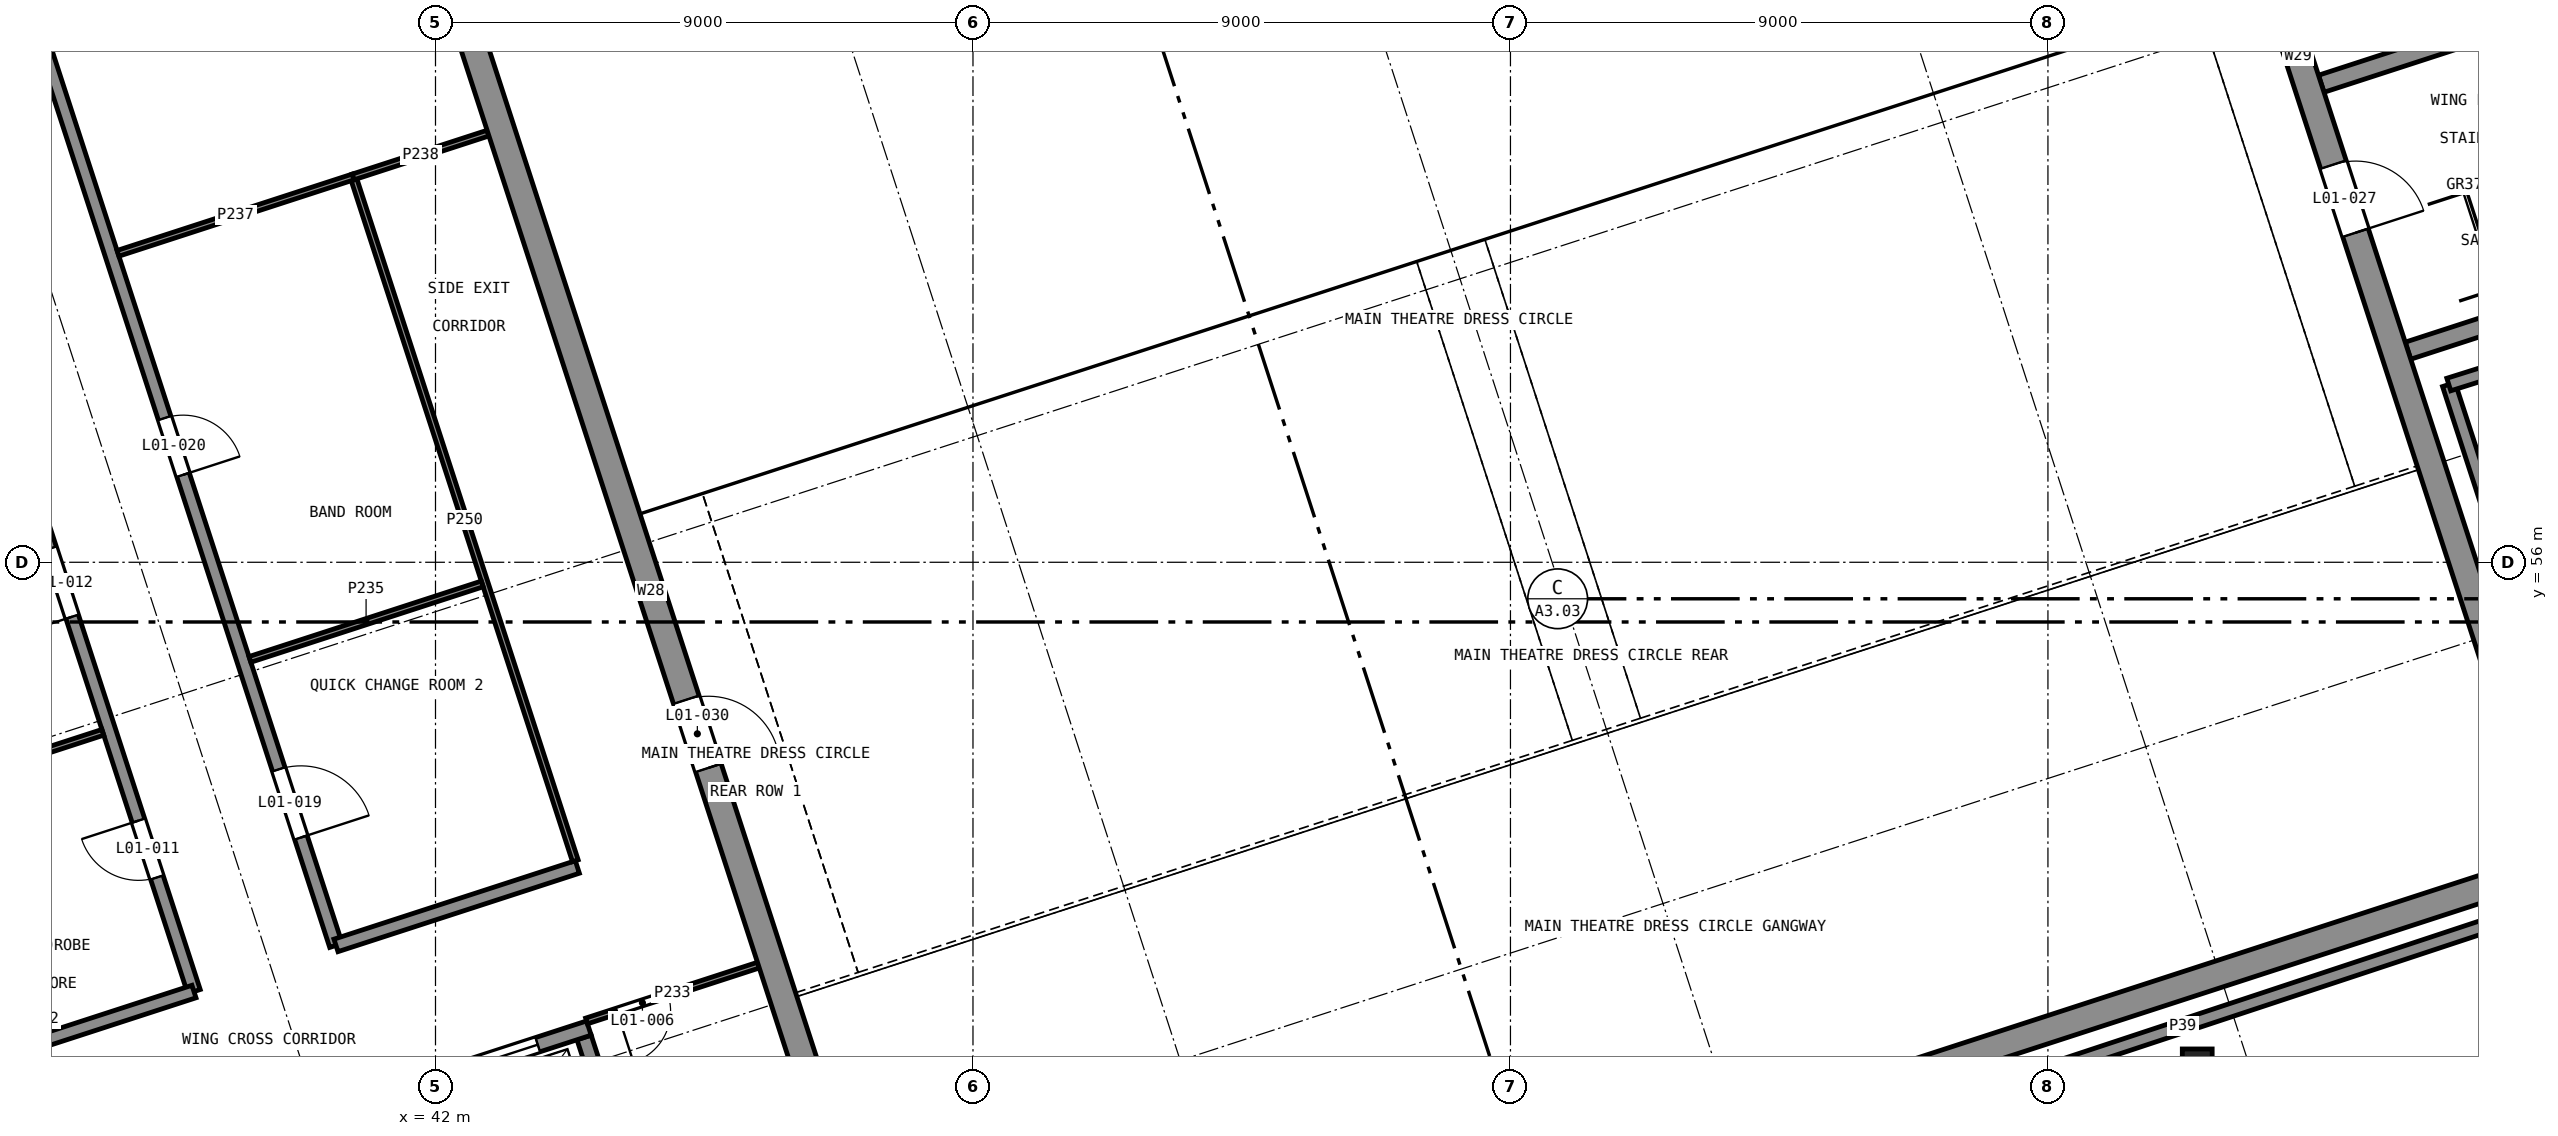
"""IFC4 building model, lengths in metres.
Left out: names, types, materials, properties, quantities, classifications, styles, units other than length and angle.
Written with IfcOpenShell. Run it as: python <this file> out.ifc"""

import sys

from ifc_helpers import new_model, si_unit, direction, frame, frame_2d, origin, origin_2d, place, context, subcontext, project, spatial, rectangle, extrude, element, fill, save


model = new_model("IFC4")
c1 = context("Model", 3, precision=1e-05, world=origin(), true_north=direction((0.0, 1.0)))
c2 = subcontext(c1, "Body", "Model", "MODEL_VIEW")
j1 = project(units=[si_unit("LENGTHUNIT", "METRE"), si_unit("PLANEANGLEUNIT", "RADIAN")], contexts=[c1])
p1 = place(None, origin())
s1 = spatial("IfcSite", under=j1, at=p1, CompositionType="ELEMENT")
p2 = place(p1, origin())
s2 = spatial("IfcBuilding", under=s1, at=p2, CompositionType="ELEMENT")
p3 = place(p2, frame((0.0, 0.0, 5.5)))
s3 = spatial("IfcBuildingStorey", under=s2, at=p3, CompositionType="ELEMENT", Elevation=5.5)
p4 = place(p3, frame((49.786, 41.93, 0.0), z_axis=(0.0, 0.0, 1.0), x_axis=(0.951055937194, 0.309018776661, 0.0)))
e1 = element("IfcWall", 1, at=p4, inside=s3, PredefinedType="SHEAR", context=c2, shape_type="SweptSolid", body=[
    extrude(rectangle(XDim=29.45, YDim=0.45, at=frame_2d((14.725, 0.0))), origin(), (0.0, 0.0, 1.0), 4.0),
])
p5 = place(p3, frame((49.93, 42.214, 0.0), z_axis=(0.0, 0.0, 1.0), x_axis=(-0.309016215614, 0.95105676933, 0.0)))
e2 = element("IfcWall", 2, at=p5, inside=s3, PredefinedType="SHEAR", context=c2, shape_type="SweptSolid", body=[
    extrude(rectangle(XDim=27.975, YDim=0.45, at=frame_2d((13.988, 0.0))), origin(), (0.0, 0.0, 1.0), 4.0),
])
p6 = place(p5, frame((10.875, 0.0, 0.0)))
e3 = element("IfcOpeningElement", 3, at=p6, cuts=e2, PredefinedType="OPENING", context=c2, shape_type="SweptSolid", body=[
    extrude(rectangle(XDim=1.2, YDim=2.1, at=frame_2d((0.6, 1.05))), frame((0.0, 0.235, 0.0), z_axis=(0.0, -1.0, 0.0), x_axis=(1.0, 0.0, 0.0)), (0.0, 0.0, 1.0), 0.47),
])
p7 = place(p3, frame((77.511, 51.176, 0.0), z_axis=(0.0, 0.0, 1.0), x_axis=(-0.309018780445, 0.951055935964, 0.0)))
e4 = element("IfcWall", 4, at=p7, inside=s3, PredefinedType="SHEAR", context=c2, shape_type="SweptSolid", body=[
    extrude(rectangle(XDim=27.975, YDim=0.45, at=frame_2d((13.987, 0.0))), origin(), (0.0, 0.0, 1.0), 4.0),
])
p8 = place(p7, frame((10.875, 0.0, 0.0)))
e5 = element("IfcOpeningElement", 5, at=p8, cuts=e4, PredefinedType="OPENING", context=c2, shape_type="SweptSolid", body=[
    extrude(rectangle(XDim=1.2, YDim=2.1, at=frame_2d((0.6, 1.05))), frame((0.0, 0.235, 0.0), z_axis=(0.0, -1.0, 0.0), x_axis=(1.0, 0.0, 0.0)), (0.0, 0.0, 1.0), 0.47),
])
p9 = place(p3, frame((75.029, 59.543, 0.0), z_axis=(0.0, 0.0, 1.0), x_axis=(0.951057649576, 0.309013506475, 0.0)))
e6 = element("IfcWall", 6, at=p9, inside=s3, PredefinedType="SOLIDWALL", context=c2, shape_type="SweptSolid", body=[
    extrude(rectangle(XDim=7.075, YDim=0.3, at=frame_2d((3.538, 0.0))), origin(), (0.0, 0.0, 1.0), 3.7),
])
p10 = place(p3, frame((80.305, 66.199, 0.0), z_axis=(0.0, 0.0, 1.0), x_axis=(-0.951054354327, -0.309023648149, 0.0)))
e7 = element("IfcWall", 7, at=p10, inside=s3, PredefinedType="SOLIDWALL", context=c2, shape_type="SweptSolid", body=[
    extrude(rectangle(XDim=7.075, YDim=0.3, at=frame_2d((3.537, 0.0))), origin(), (0.0, 0.0, 1.0), 3.7),
])
p11 = place(p3, frame((44.982, 46.521, 0.0), z_axis=(0.0, 0.0, 1.0), x_axis=(-0.308986014439, 0.951066581729, 0.0)))
e8 = element("IfcWall", 8, at=p11, inside=s3, PredefinedType="SHEAR", context=c2, shape_type="SweptSolid", body=[
    extrude(rectangle(XDim=1.6, YDim=0.25, at=frame_2d((0.8, 0.0))), origin(), (0.0, 0.0, 1.0), 4.0),
])
p12 = place(p3, frame((44.568, 48.2, 0.0), z_axis=(0.0, 0.0, 1.0), x_axis=(-0.951047059821, -0.309046096893, 0.0)))
e9 = element("IfcWall", 9, at=p12, inside=s3, PredefinedType="SHEAR", context=c2, shape_type="SweptSolid", body=[
    extrude(rectangle(XDim=2.9, YDim=0.25, at=frame_2d((1.45, 0.0))), origin(), (0.0, 0.0, 1.0), 4.0),
])
p13 = place(p12, frame((0.9, 0.0, 0.0)))
e10 = element("IfcOpeningElement", 10, at=p13, cuts=e9, PredefinedType="OPENING", context=c2, shape_type="SweptSolid", body=[
    extrude(rectangle(XDim=1.1, YDim=2.1, at=frame_2d((0.55, 1.05))), frame((0.0, 0.135, 0.0), z_axis=(0.0, -1.0, 0.0), x_axis=(1.0, 0.0, 0.0)), (0.0, 0.0, 1.0), 0.27),
])
p14 = place(p3, frame((71.5, 47.6, 0.0), z_axis=(0.0, 0.0, 1.0), x_axis=(1.0, 0.0, 0.0)))
e11 = element("IfcColumn", 11, at=p14, inside=s3, PredefinedType="COLUMN", context=c2, shape_type="SweptSolid", body=[
    extrude(rectangle(XDim=0.5, YDim=0.5, at=origin_2d()), origin(), (0.0, 0.0, 1.0), 4.0),
])
p15 = place(p3, frame((64.081, 45.859, 0.0), z_axis=(0.0, 0.0, 1.0), x_axis=(0.949388338269, 0.314104732786, 0.0)))
e12 = element("IfcWall", 12, at=p15, inside=s3, PredefinedType="SOLIDWALL", context=c2, shape_type="SweptSolid", body=[
    extrude(rectangle(XDim=15.116, YDim=0.22, at=frame_2d((7.558, 0.0))), origin(), (0.0, 0.0, 1.0), 3.7),
])
p16 = place(p3, frame((78.432, 50.607, 0.0), z_axis=(0.0, 0.0, 1.0), x_axis=(-0.309027731765, 0.951053027439, 0.0)))
e13 = element("IfcWall", 13, at=p16, inside=s3, PredefinedType="SOLIDWALL", context=c2, shape_type="SweptSolid", body=[
    extrude(rectangle(XDim=8.8, YDim=0.22, at=frame_2d((4.4, 0.0))), origin(), (0.0, 0.0, 1.0), 3.7),
])
p17 = place(p3, frame((75.712, 58.977, 0.0), z_axis=(0.0, 0.0, 1.0), x_axis=(0.954020604523, 0.299741031802, 0.0)))
e14 = element("IfcWall", 14, at=p17, inside=s3, PredefinedType="SOLIDWALL", context=c2, shape_type="SweptSolid", body=[
    extrude(rectangle(XDim=7.271, YDim=0.22, at=frame_2d((3.635, 0.0))), origin(), (0.0, 0.0, 1.0), 3.7),
])
p18 = place(p3, frame((37.956, 48.812, 0.0), z_axis=(0.0, 0.0, 1.0), x_axis=(-0.30901736393, 0.951056396219, 0.0)))
e15 = element("IfcWall", 15, at=p18, inside=s3, PredefinedType="SOLIDWALL", context=c2, shape_type="SweptSolid", body=[
    extrude(rectangle(XDim=41.7, YDim=0.22, at=frame_2d((20.85, 0.0))), origin(), (0.0, 0.0, 1.0), 3.7),
])
p19 = place(p18, frame((2.009, 0.0, 0.0)))
e16 = element("IfcOpeningElement", 16, at=p19, cuts=e15, PredefinedType="OPENING", context=c2, shape_type="SweptSolid", body=[
    extrude(rectangle(XDim=1.0, YDim=2.1, at=frame_2d((0.5, 1.05))), frame((0.0, 0.12, 0.0), z_axis=(0.0, -1.0, 0.0), x_axis=(1.0, 0.0, 0.0)), (0.0, 0.0, 1.0), 0.24),
])
p20 = place(p18, frame((6.6, 0.0, 0.0)))
e17 = element("IfcOpeningElement", 17, at=p20, cuts=e15, PredefinedType="OPENING", context=c2, shape_type="SweptSolid", body=[
    extrude(rectangle(XDim=1.2, YDim=2.1, at=frame_2d((0.6, 1.05))), frame((0.0, 0.12, 0.0), z_axis=(0.0, -1.0, 0.0), x_axis=(1.0, 0.0, 0.0)), (0.0, 0.0, 1.0), 0.24),
])
p21 = place(p18, frame((11.7, 0.0, 0.0)))
e18 = element("IfcOpeningElement", 18, at=p21, cuts=e15, PredefinedType="OPENING", context=c2, shape_type="SweptSolid", body=[
    extrude(rectangle(XDim=1.2, YDim=2.1, at=frame_2d((0.6, 1.05))), frame((0.0, 0.12, 0.0), z_axis=(0.0, -1.0, 0.0), x_axis=(1.0, 0.0, 0.0)), (0.0, 0.0, 1.0), 0.24),
])
p22 = place(p18, frame((16.7, 0.0, 0.0)))
e19 = element("IfcOpeningElement", 19, at=p22, cuts=e15, PredefinedType="OPENING", context=c2, shape_type="SweptSolid", body=[
    extrude(rectangle(XDim=1.2, YDim=2.1, at=frame_2d((0.6, 1.05))), frame((0.0, 0.12, 0.0), z_axis=(0.0, -1.0, 0.0), x_axis=(1.0, 0.0, 0.0)), (0.0, 0.0, 1.0), 0.24),
])
p23 = place(p18, frame((21.7, 0.0, 0.0)))
e20 = element("IfcOpeningElement", 20, at=p23, cuts=e15, PredefinedType="OPENING", context=c2, shape_type="SweptSolid", body=[
    extrude(rectangle(XDim=1.2, YDim=2.1, at=frame_2d((0.6, 1.05))), frame((0.0, 0.12, 0.0), z_axis=(0.0, -1.0, 0.0), x_axis=(1.0, 0.0, 0.0)), (0.0, 0.0, 1.0), 0.24),
])
p24 = place(p18, frame((26.7, 0.0, 0.0)))
e21 = element("IfcOpeningElement", 21, at=p24, cuts=e15, PredefinedType="OPENING", context=c2, shape_type="SweptSolid", body=[
    extrude(rectangle(XDim=1.2, YDim=2.1, at=frame_2d((0.6, 1.05))), frame((0.0, 0.12, 0.0), z_axis=(0.0, -1.0, 0.0), x_axis=(1.0, 0.0, 0.0)), (0.0, 0.0, 1.0), 0.24),
])
p25 = place(p18, frame((31.739, 0.0, 0.0)))
e22 = element("IfcOpeningElement", 22, at=p25, cuts=e15, PredefinedType="OPENING", context=c2, shape_type="SweptSolid", body=[
    extrude(rectangle(XDim=1.2, YDim=2.1, at=frame_2d((0.6, 1.05))), frame((0.0, 0.12, 0.0), z_axis=(0.0, -1.0, 0.0), x_axis=(1.0, 0.0, 0.0)), (0.0, 0.0, 1.0), 0.24),
])
p26 = place(p3, frame((40.333, 49.584, 0.0), z_axis=(0.0, 0.0, 1.0), x_axis=(-0.309015643281, 0.951056955291, 0.0)))
e23 = element("IfcWall", 23, at=p26, inside=s3, PredefinedType="SOLIDWALL", context=c2, shape_type="SweptSolid", body=[
    extrude(rectangle(XDim=41.7, YDim=0.22, at=frame_2d((20.85, 0.0))), origin(), (0.0, 0.0, 1.0), 3.7),
])
p27 = place(p26, frame((1.9, 0.0, 0.0)))
e24 = element("IfcOpeningElement", 24, at=p27, cuts=e23, PredefinedType="OPENING", context=c2, shape_type="SweptSolid", body=[
    extrude(rectangle(XDim=1.2, YDim=2.1, at=frame_2d((0.6, 1.05))), frame((0.0, 0.12, 0.0), z_axis=(0.0, -1.0, 0.0), x_axis=(1.0, 0.0, 0.0)), (0.0, 0.0, 1.0), 0.24),
])
p28 = place(p26, frame((8.285, 0.0, 0.0)))
e25 = element("IfcOpeningElement", 25, at=p28, cuts=e23, PredefinedType="OPENING", context=c2, shape_type="SweptSolid", body=[
    extrude(rectangle(XDim=1.0, YDim=2.1, at=frame_2d((0.5, 1.05))), frame((0.0, 0.12, 0.0), z_axis=(0.0, -1.0, 0.0), x_axis=(1.0, 0.0, 0.0)), (0.0, 0.0, 1.0), 0.24),
])
p29 = place(p26, frame((16.375, 0.0, 0.0)))
e26 = element("IfcOpeningElement", 26, at=p29, cuts=e23, PredefinedType="OPENING", context=c2, shape_type="SweptSolid", body=[
    extrude(rectangle(XDim=1.2, YDim=2.1, at=frame_2d((0.6, 1.05))), frame((0.0, 0.12, 0.0), z_axis=(0.0, -1.0, 0.0), x_axis=(1.0, 0.0, 0.0)), (0.0, 0.0, 1.0), 0.24),
])
p30 = place(p26, frame((25.752, 0.0, 0.0)))
e27 = element("IfcOpeningElement", 27, at=p30, cuts=e23, PredefinedType="OPENING", context=c2, shape_type="SweptSolid", body=[
    extrude(rectangle(XDim=1.0, YDim=2.1, at=frame_2d((0.5, 1.05))), frame((0.0, 0.12, 0.0), z_axis=(0.0, -1.0, 0.0), x_axis=(1.0, 0.0, 0.0)), (0.0, 0.0, 1.0), 0.24),
])
p31 = place(p26, frame((32.761, 0.0, 0.0)))
e28 = element("IfcOpeningElement", 28, at=p31, cuts=e23, PredefinedType="OPENING", context=c2, shape_type="SweptSolid", body=[
    extrude(rectangle(XDim=1.0, YDim=2.1, at=frame_2d((0.5, 1.05))), frame((0.0, 0.12, 0.0), z_axis=(0.0, -1.0, 0.0), x_axis=(1.0, 0.0, 0.0)), (0.0, 0.0, 1.0), 0.24),
])
p32 = place(p3, frame((34.817, 47.792, 0.0), z_axis=(0.0, 0.0, 1.0), x_axis=(0.951053095941, 0.309027520945, 0.0)))
e29 = element("IfcWall", 29, at=p32, inside=s3, PredefinedType="SOLIDWALL", context=c2, shape_type="SweptSolid", body=[
    extrude(rectangle(XDim=3.3, YDim=0.22, at=frame_2d((1.65, 0.0))), origin(), (0.0, 0.0, 1.0), 3.7),
])
p33 = place(p3, frame((40.333, 49.584, 0.0), z_axis=(0.0, 0.0, 1.0), x_axis=(0.951062770994, 0.308997743729, 0.0)))
e30 = element("IfcWall", 30, at=p33, inside=s3, PredefinedType="SOLIDWALL", context=c2, shape_type="SweptSolid", body=[
    extrude(rectangle(XDim=4.25, YDim=0.22, at=frame_2d((2.125, 0.0))), origin(), (0.0, 0.0, 1.0), 3.7),
])
p34 = place(p3, frame((44.53, 48.319, 0.0), z_axis=(0.0, 0.0, 1.0), x_axis=(0.951053046121, 0.30902767427, 0.0)))
e31 = element("IfcWall", 31, at=p34, inside=s3, PredefinedType="PARTITIONING", context=c2, shape_type="SweptSolid", body=[
    extrude(rectangle(XDim=3.025, YDim=0.1, at=frame_2d((1.512, 0.0))), origin(), (0.0, 0.0, 1.0), 3.7),
])
p35 = place(p34, frame((0.533, 0.0, 0.0)))
e32 = element("IfcOpeningElement", 32, at=p35, cuts=e31, PredefinedType="OPENING", context=c2, shape_type="SweptSolid", body=[
    extrude(rectangle(XDim=0.9, YDim=2.1, at=frame_2d((0.45, 1.05))), frame((0.0, 0.06, 0.0), z_axis=(0.0, -1.0, 0.0), x_axis=(1.0, 0.0, 0.0)), (0.0, 0.0, 1.0), 0.12),
])
p36 = place(p3, frame((33.396, 52.167, 0.0), z_axis=(0.0, 0.0, 1.0), x_axis=(0.951044192343, 0.309054921027, 0.0)))
e33 = element("IfcWall", 33, at=p36, inside=s3, PredefinedType="PARTITIONING", context=c2, shape_type="SweptSolid", body=[
    extrude(rectangle(XDim=3.19, YDim=0.1, at=frame_2d((1.595, 0.0))), origin(), (0.0, 0.0, 1.0), 3.7),
])
p37 = place(p3, frame((38.893, 54.373, 0.0), z_axis=(0.0, 0.0, 1.0), x_axis=(0.951055560564, 0.309019935796, 0.0)))
e34 = element("IfcWall", 34, at=p37, inside=s3, PredefinedType="PARTITIONING", context=c2, shape_type="SweptSolid", body=[
    extrude(rectangle(XDim=4.09, YDim=0.1, at=frame_2d((2.045, 0.0))), origin(), (0.0, 0.0, 1.0), 3.7),
])
p38 = place(p3, frame((36.683, 61.173, 0.0), z_axis=(0.0, 0.0, 1.0), x_axis=(0.95105616864, 0.309018064344, 0.0)))
e35 = element("IfcWall", 35, at=p38, inside=s3, PredefinedType="PARTITIONING", context=c2, shape_type="SweptSolid", body=[
    extrude(rectangle(XDim=4.14, YDim=0.1, at=frame_2d((2.07, 0.0))), origin(), (0.0, 0.0, 1.0), 3.7),
])
p39 = place(p3, frame((40.621, 62.453, 0.0), z_axis=(0.0, 0.0, 1.0), x_axis=(0.951061260164, 0.309002393867, 0.0)))
e36 = element("IfcWall", 36, at=p39, inside=s3, PredefinedType="PARTITIONING", context=c2, shape_type="SweptSolid", body=[
    extrude(rectangle(XDim=2.375, YDim=0.1, at=frame_2d((1.188, 0.0))), origin(), (0.0, 0.0, 1.0), 3.7),
])
p40 = place(p3, frame((44.341, 51.002, 0.0), z_axis=(0.0, 0.0, 1.0), x_axis=(-0.309016547708, 0.951056661426, 0.0)))
e37 = element("IfcWall", 37, at=p40, inside=s3, PredefinedType="PARTITIONING", context=c2, shape_type="SweptSolid", body=[
    extrude(rectangle(XDim=11.99, YDim=0.1, at=frame_2d((5.995, 0.0))), origin(), (0.0, 0.0, 1.0), 3.7),
])
p41 = place(p13, origin())
e38 = element("IfcDoor", 38, at=p41, inside=s3, OperationType="SLIDING_TO_LEFT", PredefinedType="DOOR", context=c2, shape_type="SweptSolid", body=[
    extrude(rectangle(XDim=1.1, YDim=2.1, at=frame_2d((0.55, 1.05))), frame((0.0, 0.025, 0.0), z_axis=(0.0, -1.0, 0.0), x_axis=(1.0, 0.0, 0.0)), (0.0, 0.0, 1.0), 0.05),
])
fill(e10, e38)
p42 = place(p35, frame((0.9, 0.0, 0.0), z_axis=(0.0, 0.0, 1.0), x_axis=(-1.0, 0.0, 0.0)))
e39 = element("IfcDoor", 39, at=p42, inside=s3, OperationType="SINGLE_SWING_LEFT", PredefinedType="DOOR", context=c2, shape_type="SweptSolid", body=[
    extrude(rectangle(XDim=0.9, YDim=2.1, at=frame_2d((0.45, 1.05))), frame((0.0, 0.025, 0.0), z_axis=(0.0, -1.0, 0.0), x_axis=(1.0, 0.0, 0.0)), (0.0, 0.0, 1.0), 0.05),
])
fill(e32, e39)
p43 = place(p19, origin())
e40 = element("IfcDoor", 40, at=p43, inside=s3, OperationType="SINGLE_SWING_LEFT", PredefinedType="DOOR", context=c2, shape_type="SweptSolid", body=[
    extrude(rectangle(XDim=1.0, YDim=2.1, at=frame_2d((0.5, 1.05))), frame((0.0, 0.025, 0.0), z_axis=(0.0, -1.0, 0.0), x_axis=(1.0, 0.0, 0.0)), (0.0, 0.0, 1.0), 0.05),
])
fill(e16, e40)
p44 = place(p20, origin())
e41 = element("IfcDoor", 41, at=p44, inside=s3, OperationType="SINGLE_SWING_RIGHT", PredefinedType="DOOR", context=c2, shape_type="SweptSolid", body=[
    extrude(rectangle(XDim=1.2, YDim=2.1, at=frame_2d((0.6, 1.05))), frame((0.0, 0.025, 0.0), z_axis=(0.0, -1.0, 0.0), x_axis=(1.0, 0.0, 0.0)), (0.0, 0.0, 1.0), 0.05),
])
fill(e17, e41)
p45 = place(p27, frame((1.2, 0.0, 0.0), z_axis=(0.0, 0.0, 1.0), x_axis=(-1.0, 0.0, 0.0)))
e42 = element("IfcDoor", 42, at=p45, inside=s3, OperationType="SINGLE_SWING_LEFT", PredefinedType="DOOR", context=c2, shape_type="SweptSolid", body=[
    extrude(rectangle(XDim=1.2, YDim=2.1, at=frame_2d((0.6, 1.05))), frame((0.0, 0.025, 0.0), z_axis=(0.0, -1.0, 0.0), x_axis=(1.0, 0.0, 0.0)), (0.0, 0.0, 1.0), 0.05),
])
fill(e24, e42)
p46 = place(p28, frame((1.0, 0.0, 0.0), z_axis=(0.0, 0.0, 1.0), x_axis=(-1.0, 0.0, 0.0)))
e43 = element("IfcDoor", 43, at=p46, inside=s3, OperationType="SINGLE_SWING_LEFT", PredefinedType="DOOR", context=c2, shape_type="SweptSolid", body=[
    extrude(rectangle(XDim=1.0, YDim=2.1, at=frame_2d((0.5, 1.05))), frame((0.0, 0.025, 0.0), z_axis=(0.0, -1.0, 0.0), x_axis=(1.0, 0.0, 0.0)), (0.0, 0.0, 1.0), 0.05),
])
fill(e25, e43)
p47 = place(p8, frame((1.2, 0.0, 0.0), z_axis=(0.0, 0.0, 1.0), x_axis=(-1.0, 0.0, 0.0)))
e44 = element("IfcDoor", 44, at=p47, inside=s3, OperationType="SINGLE_SWING_LEFT", PredefinedType="DOOR", context=c2, shape_type="SweptSolid", body=[
    extrude(rectangle(XDim=1.2, YDim=2.1, at=frame_2d((0.6, 1.05))), frame((0.0, 0.025, 0.0), z_axis=(0.0, -1.0, 0.0), x_axis=(1.0, 0.0, 0.0)), (0.0, 0.0, 1.0), 0.05),
])
fill(e5, e44)
p48 = place(p6, frame((1.2, 0.0, 0.0), z_axis=(0.0, 0.0, 1.0), x_axis=(-1.0, 0.0, 0.0)))
e45 = element("IfcDoor", 45, at=p48, inside=s3, OperationType="SINGLE_SWING_LEFT", PredefinedType="DOOR", context=c2, shape_type="SweptSolid", body=[
    extrude(rectangle(XDim=1.2, YDim=2.1, at=frame_2d((0.6, 1.05))), frame((0.0, 0.025, 0.0), z_axis=(0.0, -1.0, 0.0), x_axis=(1.0, 0.0, 0.0)), (0.0, 0.0, 1.0), 0.05),
])
fill(e3, e45)
save(model, sys.argv[1])
